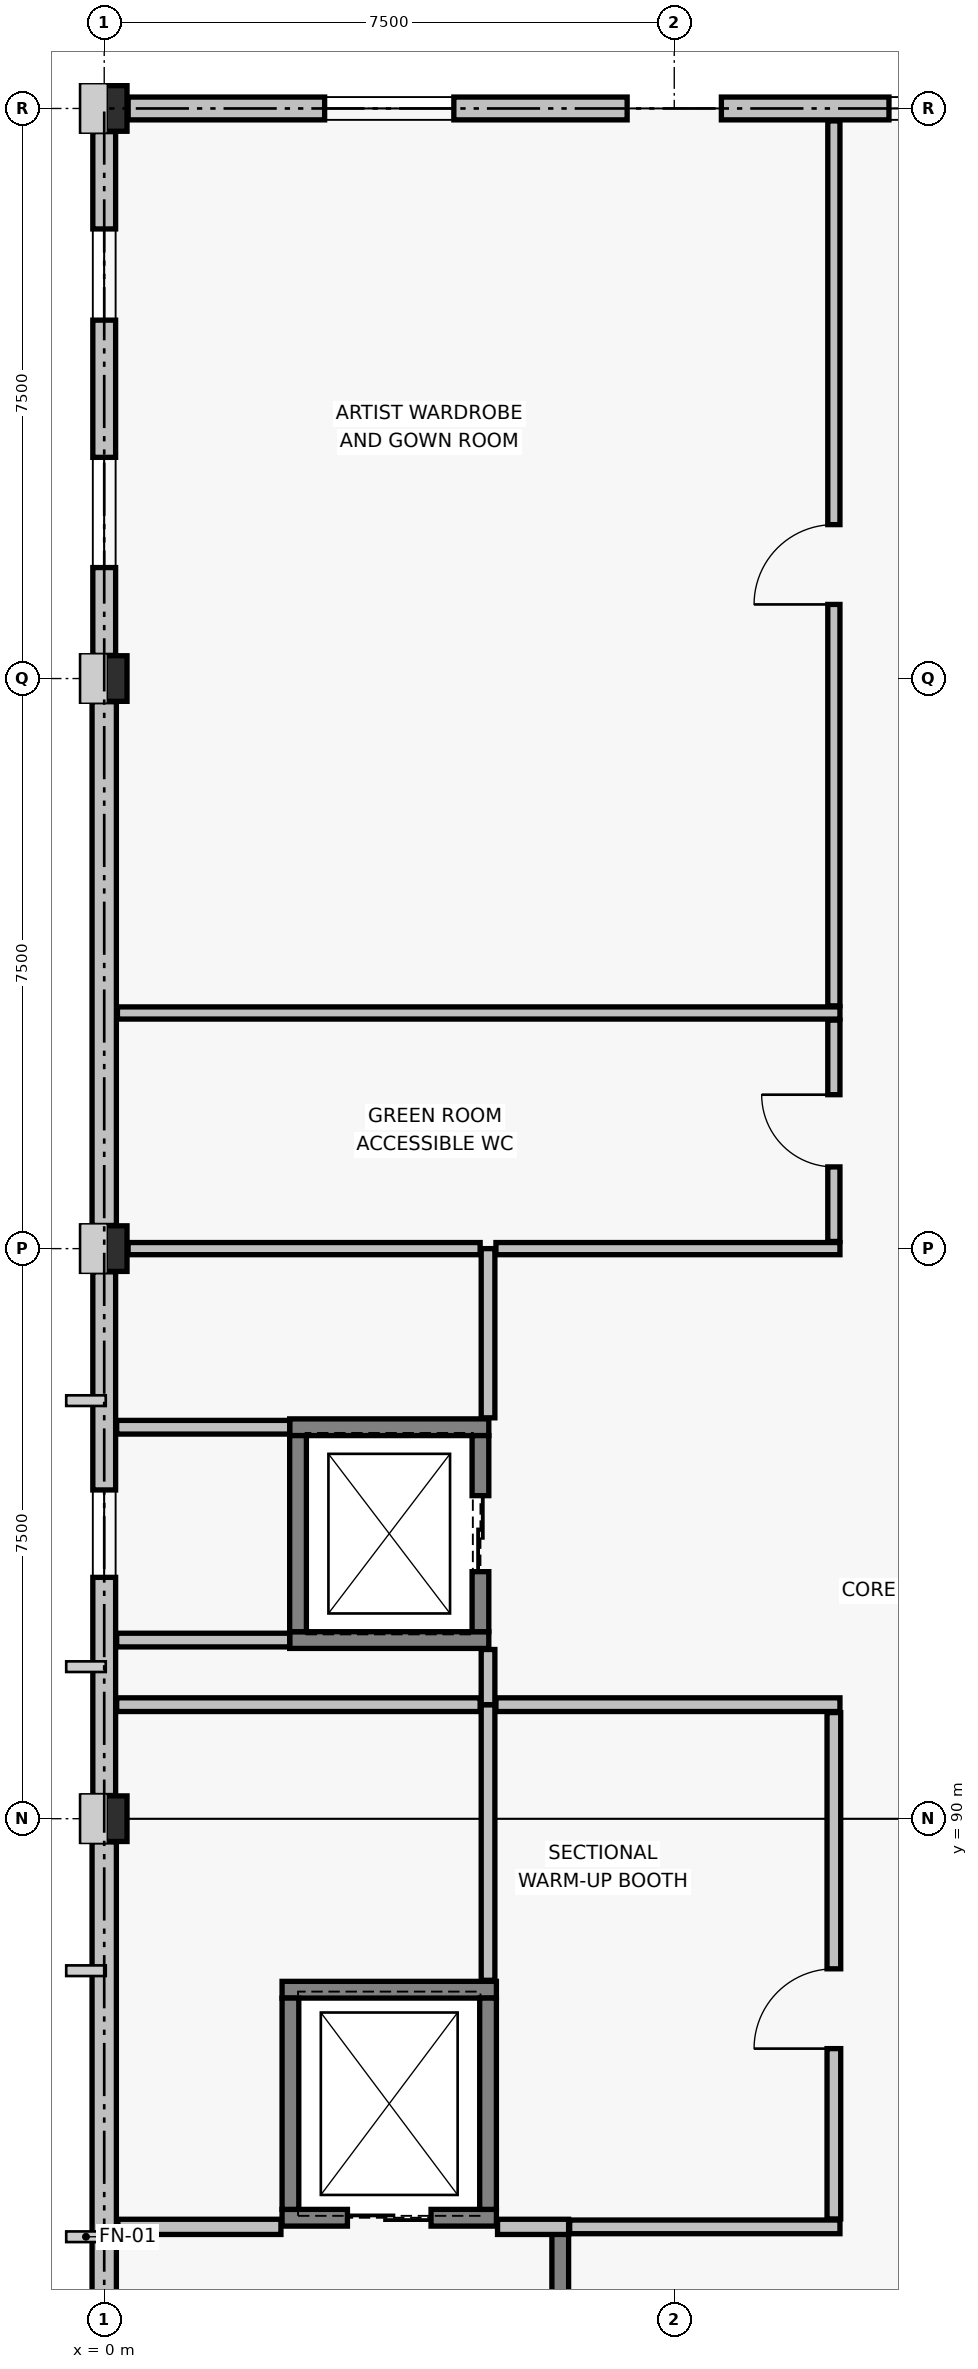
"""IFC4 building model, lengths in metres.
Left out: names, types, materials, properties, quantities, classifications, styles, units other than length and angle.
Written with IfcOpenShell. Run it as: python <this file> out.ifc"""

import sys

from ifc_helpers import new_model, si_unit, direction, frame, frame_2d, origin, origin_2d, place, context, subcontext, project, spatial, rectangle, extrude, element, fill, save


model = new_model("IFC4")
c1 = context("Model", 3, precision=1e-05, world=origin(), true_north=direction((0.0, 1.0)))
c2 = subcontext(c1, "Body", "Model", "MODEL_VIEW")
j1 = project(units=[si_unit("LENGTHUNIT", "METRE"), si_unit("PLANEANGLEUNIT", "RADIAN")], contexts=[c1])
p1 = place(None, origin())
s1 = spatial("IfcSite", under=j1, at=p1, CompositionType="ELEMENT")
p2 = place(p1, origin())
s2 = spatial("IfcBuilding", under=s1, at=p2, CompositionType="ELEMENT")
p3 = place(p2, frame((0.0, 0.0, 9.0)))
s3 = spatial("IfcBuildingStorey", under=s2, at=p3, CompositionType="ELEMENT", Elevation=9.0)
for number, where, z_axis, x_axis in (
    (1, (0.0, 90.0, 0.0), (0.0, 0.0, 1.0), (1.0, 0.0, 0.0)),
    (2, (0.0, 97.5, 0.0), (0.0, 0.0, 1.0), (1.0, 0.0, 0.0)),
    (3, (0.0, 105.0, 0.0), (0.0, 0.0, 1.0), (1.0, 0.0, 0.0)),
    (4, (0.0, 112.5, 0.0), (0.0, 0.0, 1.0), (1.0, 0.0, 0.0)),
):
    element("IfcColumn", number, at=place(p3, frame(where, z_axis=z_axis, x_axis=x_axis)), inside=s3, PredefinedType="COLUMN", context=c2, shape_type="SweptSolid", body=[
        extrude(rectangle(XDim=0.6, YDim=0.6, at=origin_2d()), origin(), (0.0, 0.0, 1.0), 4.2),
    ])
p4 = place(p3, frame((0.315, 112.5, 0.0), z_axis=(0.0, 0.0, 1.0), x_axis=(1.0, 0.0, 0.0)))
e5 = element("IfcWall", 5, at=p4, inside=s3, PredefinedType="SOLIDWALL", context=c2, shape_type="SweptSolid", body=[
    extrude(rectangle(XDim=6.565, YDim=0.3, at=frame_2d((3.282, 0.0))), origin(), (0.0, 0.0, 1.0), 2.87),
])
p5 = place(p4, frame((2.585, 0.0, 0.6)))
e6 = element("IfcOpeningElement", 6, at=p5, cuts=e5, PredefinedType="OPENING", context=c2, shape_type="SweptSolid", body=[
    extrude(rectangle(XDim=1.7, YDim=1.8, at=frame_2d((0.85, 0.9))), frame((0.0, 0.16, 0.0), z_axis=(0.0, -1.0, 0.0), x_axis=(1.0, 0.0, 0.0)), (0.0, 0.0, 1.0), 0.32),
])
p6 = place(p3, frame((8.12, 112.5, 0.0), z_axis=(0.0, 0.0, 1.0), x_axis=(1.0, 0.0, 0.0)))
e7 = element("IfcWall", 7, at=p6, inside=s3, PredefinedType="SOLIDWALL", context=c2, shape_type="SweptSolid", body=[
    extrude(rectangle(XDim=6.565, YDim=0.3, at=frame_2d((3.282, 0.0))), origin(), (0.0, 0.0, 1.0), 2.87),
])
p7 = place(p6, frame((2.205, 0.0, 0.6)))
e8 = element("IfcOpeningElement", 8, at=p7, cuts=e7, PredefinedType="OPENING", context=c2, shape_type="SweptSolid", body=[
    extrude(rectangle(XDim=1.85, YDim=1.8, at=frame_2d((0.925, 0.9))), frame((0.0, 0.16, 0.0), z_axis=(0.0, -1.0, 0.0), x_axis=(1.0, 0.0, 0.0)), (0.0, 0.0, 1.0), 0.32),
])
p8 = place(p3, frame((0.0, 82.805, 0.0), z_axis=(0.0, 0.0, 1.0), x_axis=(0.0, 1.0, 0.0)))
e9 = element("IfcWall", 9, at=p8, inside=s3, PredefinedType="SOLIDWALL", context=c2, shape_type="SweptSolid", body=[
    extrude(rectangle(XDim=6.89, YDim=0.32, at=frame_2d((3.445, 0.0))), origin(), (0.0, 0.0, 1.0), 2.87),
])
p9 = place(p3, frame((0.0, 90.305, 0.0), z_axis=(0.0, 0.0, 1.0), x_axis=(0.0, 1.0, 0.0)))
e10 = element("IfcWall", 10, at=p9, inside=s3, PredefinedType="SOLIDWALL", context=c2, shape_type="SweptSolid", body=[
    extrude(rectangle(XDim=6.89, YDim=0.3, at=frame_2d((3.445, 0.0))), origin(), (0.0, 0.0, 1.0), 2.87),
])
p10 = place(p9, frame((2.87, 0.0, 0.6)))
e11 = element("IfcOpeningElement", 11, at=p10, cuts=e10, PredefinedType="OPENING", context=c2, shape_type="SweptSolid", body=[
    extrude(rectangle(XDim=1.15, YDim=1.3, at=frame_2d((0.575, 0.65))), frame((0.0, 0.16, 0.0), z_axis=(0.0, -1.0, 0.0), x_axis=(1.0, 0.0, 0.0)), (0.0, 0.0, 1.0), 0.32),
])
p11 = place(p3, frame((0.0, 97.805, 0.0), z_axis=(0.0, 0.0, 1.0), x_axis=(0.0, 1.0, 0.0)))
e12 = element("IfcWall", 12, at=p11, inside=s3, PredefinedType="SOLIDWALL", context=c2, shape_type="SweptSolid", body=[
    extrude(rectangle(XDim=6.89, YDim=0.32, at=frame_2d((3.445, 0.0))), origin(), (0.0, 0.0, 1.0), 2.87),
])
p12 = place(p3, frame((0.0, 105.305, 0.0), z_axis=(0.0, 0.0, 1.0), x_axis=(0.0, 1.0, 0.0)))
e13 = element("IfcWall", 13, at=p12, inside=s3, PredefinedType="SOLIDWALL", context=c2, shape_type="SweptSolid", body=[
    extrude(rectangle(XDim=6.89, YDim=0.3, at=frame_2d((3.445, 0.0))), origin(), (0.0, 0.0, 1.0), 2.87),
])
p13 = place(p12, frame((1.155, 0.0, 0.6)))
e14 = element("IfcOpeningElement", 14, at=p13, cuts=e13, PredefinedType="OPENING", context=c2, shape_type="SweptSolid", body=[
    extrude(rectangle(XDim=1.45, YDim=1.3, at=frame_2d((0.725, 0.65))), frame((0.0, 0.16, 0.0), z_axis=(0.0, -1.0, 0.0), x_axis=(1.0, 0.0, 0.0)), (0.0, 0.0, 1.0), 0.32),
])
p14 = place(p12, frame((4.41, 0.0, 0.6)))
e15 = element("IfcOpeningElement", 15, at=p14, cuts=e13, PredefinedType="OPENING", context=c2, shape_type="SweptSolid", body=[
    extrude(rectangle(XDim=1.2, YDim=1.2, at=frame_2d((0.6, 0.6))), frame((0.0, 0.16, 0.0), z_axis=(0.0, -1.0, 0.0), x_axis=(1.0, 0.0, 0.0)), (0.0, 0.0, 1.0), 0.32),
])
for number, where, z_axis, x_axis in (
    (16, (2.44, 92.35, 0.0), (0.0, 0.0, 1.0), (1.0, 0.0, 0.0)),
    (17, (2.44, 95.15, 0.0), (0.0, 0.0, 1.0), (1.0, 0.0, 0.0)),
):
    element("IfcWall", number, at=place(p3, frame(where, z_axis=z_axis, x_axis=x_axis)), inside=s3, PredefinedType="SOLIDWALL", context=c2, shape_type="SweptSolid", body=[
        extrude(rectangle(XDim=2.62, YDim=0.22, at=frame_2d((1.31, 0.0))), origin(), (0.0, 0.0, 1.0), 3.92),
    ])
p15 = place(p3, frame((2.55, 92.46, 0.0), z_axis=(0.0, 0.0, 1.0), x_axis=(0.0, 1.0, 0.0)))
e18 = element("IfcWall", 18, at=p15, inside=s3, PredefinedType="SOLIDWALL", context=c2, shape_type="SweptSolid", body=[
    extrude(rectangle(XDim=2.58, YDim=0.22, at=frame_2d((1.29, 0.0))), origin(), (0.0, 0.0, 1.0), 3.92),
])
p16 = place(p3, frame((4.95, 92.46, 0.0), z_axis=(0.0, 0.0, 1.0), x_axis=(0.0, 1.0, 0.0)))
e19 = element("IfcWall", 19, at=p16, inside=s3, PredefinedType="SOLIDWALL", context=c2, shape_type="SweptSolid", body=[
    extrude(rectangle(XDim=2.58, YDim=0.22, at=frame_2d((1.29, 0.0))), origin(), (0.0, 0.0, 1.0), 3.92),
])
p17 = place(p16, frame((0.79, 0.0, 0.0)))
e20 = element("IfcOpeningElement", 20, at=p17, cuts=e19, PredefinedType="OPENING", context=c2, shape_type="SweptSolid", body=[
    extrude(rectangle(XDim=1.0, YDim=2.15, at=frame_2d((0.5, 1.075))), frame((0.0, 0.12, 0.0), z_axis=(0.0, -1.0, 0.0), x_axis=(1.0, 0.0, 0.0)), (0.0, 0.0, 1.0), 0.24),
])
p18 = place(p3, frame((2.34, 84.75, 0.0), z_axis=(0.0, 0.0, 1.0), x_axis=(1.0, 0.0, 0.0)))
e21 = element("IfcWall", 21, at=p18, inside=s3, PredefinedType="SOLIDWALL", context=c2, shape_type="SweptSolid", body=[
    extrude(rectangle(XDim=2.82, YDim=0.22, at=frame_2d((1.41, 0.0))), origin(), (0.0, 0.0, 1.0), 3.92),
])
p19 = place(p18, frame((0.86, 0.0, 0.0)))
e22 = element("IfcOpeningElement", 22, at=p19, cuts=e21, PredefinedType="OPENING", context=c2, shape_type="SweptSolid", body=[
    extrude(rectangle(XDim=1.1, YDim=2.15, at=frame_2d((0.55, 1.075))), frame((0.0, 0.12, 0.0), z_axis=(0.0, -1.0, 0.0), x_axis=(1.0, 0.0, 0.0)), (0.0, 0.0, 1.0), 0.24),
])
p20 = place(p3, frame((2.34, 87.75, 0.0), z_axis=(0.0, 0.0, 1.0), x_axis=(1.0, 0.0, 0.0)))
e23 = element("IfcWall", 23, at=p20, inside=s3, PredefinedType="SOLIDWALL", context=c2, shape_type="SweptSolid", body=[
    extrude(rectangle(XDim=2.82, YDim=0.22, at=frame_2d((1.41, 0.0))), origin(), (0.0, 0.0, 1.0), 3.92),
])
for number, where, z_axis, x_axis in (
    (24, (2.45, 84.86, 0.0), (0.0, 0.0, 1.0), (0.0, 1.0, 0.0)),
    (25, (5.05, 84.86, 0.0), (0.0, 0.0, 1.0), (0.0, 1.0, 0.0)),
):
    element("IfcWall", number, at=place(p3, frame(where, z_axis=z_axis, x_axis=x_axis)), inside=s3, PredefinedType="SOLIDWALL", context=c2, shape_type="SweptSolid", body=[
        extrude(rectangle(XDim=2.78, YDim=0.22, at=frame_2d((1.39, 0.0))), origin(), (0.0, 0.0, 1.0), 3.92),
    ])
p21 = place(p3, frame((6.0, 80.26, 0.0), z_axis=(0.0, 0.0, 1.0), x_axis=(0.0, 1.0, 0.0)))
e26 = element("IfcWall", 26, at=p21, inside=s3, PredefinedType="SOLIDWALL", context=c2, shape_type="SweptSolid", body=[
    extrude(rectangle(XDim=4.37, YDim=0.22, at=frame_2d((2.185, 0.0))), origin(), (0.0, 0.0, 1.0), 3.92),
])
p22 = place(p21, frame((0.45, 0.0, 0.0)))
e27 = element("IfcOpeningElement", 27, at=p22, cuts=e26, PredefinedType="OPENING", context=c2, shape_type="SweptSolid", body=[
    extrude(rectangle(XDim=1.1, YDim=2.15, at=frame_2d((0.55, 1.075))), frame((0.0, 0.12, 0.0), z_axis=(0.0, -1.0, 0.0), x_axis=(1.0, 0.0, 0.0)), (0.0, 0.0, 1.0), 0.24),
])
p23 = place(p3, frame((0.18, 84.63, 0.0), z_axis=(0.0, 0.0, 1.0), x_axis=(1.0, 0.0, 0.0)))
e28 = element("IfcWall", 28, at=p23, inside=s3, PredefinedType="PARTITIONING", context=c2, shape_type="SweptSolid", body=[
    extrude(rectangle(XDim=2.145, YDim=0.2, at=frame_2d((1.073, 0.0))), origin(), (0.0, 0.0, 1.0), 3.28),
])
p24 = place(p3, frame((5.175, 84.63, 0.0), z_axis=(0.0, 0.0, 1.0), x_axis=(1.0, 0.0, 0.0)))
e29 = element("IfcWall", 29, at=p24, inside=s3, PredefinedType="PARTITIONING", context=c2, shape_type="SweptSolid", body=[
    extrude(rectangle(XDim=0.935, YDim=0.2, at=frame_2d((0.468, 0.0))), origin(), (0.0, 0.0, 1.0), 3.33),
])
p25 = place(p3, frame((5.05, 87.874, 0.0), z_axis=(0.0, 0.0, 1.0), x_axis=(0.0, 1.0, 0.0)))
e30 = element("IfcWall", 30, at=p25, inside=s3, PredefinedType="PARTITIONING", context=c2, shape_type="SweptSolid", body=[
    extrude(rectangle(XDim=3.626, YDim=0.18, at=frame_2d((1.813, 0.0))), origin(), (0.0, 0.0, 1.0), 2.87),
])
p26 = place(p3, frame((6.124, 84.63, 0.0), z_axis=(0.0, 0.0, 1.0), x_axis=(1.0, 0.0, 0.0)))
e31 = element("IfcWall", 31, at=p26, inside=s3, PredefinedType="PARTITIONING", context=c2, shape_type="SweptSolid", body=[
    extrude(rectangle(XDim=3.556, YDim=0.18, at=frame_2d((1.778, 0.0))), origin(), (0.0, 0.0, 1.0), 3.27),
])
p27 = place(p3, frame((0.164, 91.5, 0.0), z_axis=(0.0, 0.0, 1.0), x_axis=(1.0, 0.0, 0.0)))
e32 = element("IfcWall", 32, at=p27, inside=s3, PredefinedType="PARTITIONING", context=c2, shape_type="SweptSolid", body=[
    extrude(rectangle(XDim=4.782, YDim=0.18, at=frame_2d((2.391, 0.0))), origin(), (0.0, 0.0, 1.0), 3.12),
])
p28 = place(p3, frame((5.154, 91.5, 0.0), z_axis=(0.0, 0.0, 1.0), x_axis=(1.0, 0.0, 0.0)))
e33 = element("IfcWall", 33, at=p28, inside=s3, PredefinedType="PARTITIONING", context=c2, shape_type="SweptSolid", body=[
    extrude(rectangle(XDim=4.526, YDim=0.18, at=frame_2d((2.263, 0.0))), origin(), (0.0, 0.0, 1.0), 3.27),
])
p29 = place(p3, frame((9.6, 84.734, 0.0), z_axis=(0.0, 0.0, 1.0), x_axis=(0.0, 1.0, 0.0)))
e34 = element("IfcWall", 34, at=p29, inside=s3, PredefinedType="PARTITIONING", context=c2, shape_type="SweptSolid", body=[
    extrude(rectangle(XDim=6.662, YDim=0.18, at=frame_2d((3.331, 0.0))), origin(), (0.0, 0.0, 1.0), 2.87),
])
p30 = place(p29, frame((2.241, 0.0, 0.0)))
e35 = element("IfcOpeningElement", 35, at=p30, cuts=e34, PredefinedType="OPENING", context=c2, shape_type="SweptSolid", body=[
    extrude(rectangle(XDim=1.05, YDim=2.12, at=frame_2d((0.525, 1.06))), frame((0.0, 0.1, 0.0), z_axis=(0.0, -1.0, 0.0), x_axis=(1.0, 0.0, 0.0)), (0.0, 0.0, 1.0), 0.2),
])
for number, where, z_axis, x_axis in (
    (36, (0.164, 92.35, 0.0), (0.0, 0.0, 1.0), (1.0, 0.0, 0.0)),
    (37, (0.164, 95.15, 0.0), (0.0, 0.0, 1.0), (1.0, 0.0, 0.0)),
):
    element("IfcWall", number, at=place(p3, frame(where, z_axis=z_axis, x_axis=x_axis)), inside=s3, PredefinedType="PARTITIONING", context=c2, shape_type="SweptSolid", body=[
        extrude(rectangle(XDim=2.276, YDim=0.18, at=frame_2d((1.138, 0.0))), origin(), (0.0, 0.0, 1.0), 3.12),
    ])
p31 = place(p3, frame((5.05, 91.5, 0.0), z_axis=(0.0, 0.0, 1.0), x_axis=(0.0, 1.0, 0.0)))
e38 = element("IfcWall", 38, at=p31, inside=s3, PredefinedType="PARTITIONING", context=c2, shape_type="SweptSolid", body=[
    extrude(rectangle(XDim=0.726, YDim=0.18, at=frame_2d((0.363, 0.0))), origin(), (0.0, 0.0, 1.0), 3.27),
])
p32 = place(p3, frame((5.05, 95.274, 0.0), z_axis=(0.0, 0.0, 1.0), x_axis=(0.0, 1.0, 0.0)))
e39 = element("IfcWall", 39, at=p32, inside=s3, PredefinedType="PARTITIONING", context=c2, shape_type="SweptSolid", body=[
    extrude(rectangle(XDim=2.226, YDim=0.18, at=frame_2d((1.113, 0.0))), origin(), (0.0, 0.0, 1.0), 2.87),
])
p33 = place(p3, frame((0.314, 97.5, 0.0), z_axis=(0.0, 0.0, 1.0), x_axis=(1.0, 0.0, 0.0)))
e40 = element("IfcWall", 40, at=p33, inside=s3, PredefinedType="PARTITIONING", context=c2, shape_type="SweptSolid", body=[
    extrude(rectangle(XDim=4.632, YDim=0.16, at=frame_2d((2.316, 0.0))), origin(), (0.0, 0.0, 1.0), 2.87),
])
p34 = place(p3, frame((5.154, 97.5, 0.0), z_axis=(0.0, 0.0, 1.0), x_axis=(1.0, 0.0, 0.0)))
e41 = element("IfcWall", 41, at=p34, inside=s3, PredefinedType="PARTITIONING", context=c2, shape_type="SweptSolid", body=[
    extrude(rectangle(XDim=4.526, YDim=0.16, at=frame_2d((2.263, 0.0))), origin(), (0.0, 0.0, 1.0), 2.87),
])
p35 = place(p3, frame((0.174, 100.6, 0.0), z_axis=(0.0, 0.0, 1.0), x_axis=(1.0, 0.0, 0.0)))
e42 = element("IfcWall", 42, at=p35, inside=s3, PredefinedType="PARTITIONING", context=c2, shape_type="SweptSolid", body=[
    extrude(rectangle(XDim=9.506, YDim=0.16, at=frame_2d((4.753, 0.0))), origin(), (0.0, 0.0, 1.0), 3.12),
])
p36 = place(p3, frame((9.6, 97.594, 0.0), z_axis=(0.0, 0.0, 1.0), x_axis=(0.0, 1.0, 0.0)))
e43 = element("IfcWall", 43, at=p36, inside=s3, PredefinedType="PARTITIONING", context=c2, shape_type="SweptSolid", body=[
    extrude(rectangle(XDim=2.912, YDim=0.16, at=frame_2d((1.456, 0.0))), origin(), (0.0, 0.0, 1.0), 2.87),
])
p37 = place(p36, frame((0.981, 0.0, 0.0)))
e44 = element("IfcOpeningElement", 44, at=p37, cuts=e43, PredefinedType="OPENING", context=c2, shape_type="SweptSolid", body=[
    extrude(rectangle(XDim=0.95, YDim=2.1, at=frame_2d((0.475, 1.05))), frame((0.0, 0.09, 0.0), z_axis=(0.0, -1.0, 0.0), x_axis=(1.0, 0.0, 0.0)), (0.0, 0.0, 1.0), 0.18),
])
p38 = place(p3, frame((9.6, 100.694, 0.0), z_axis=(0.0, 0.0, 1.0), x_axis=(0.0, 1.0, 0.0)))
e45 = element("IfcWall", 45, at=p38, inside=s3, PredefinedType="PARTITIONING", context=c2, shape_type="SweptSolid", body=[
    extrude(rectangle(XDim=11.642, YDim=0.16, at=frame_2d((5.821, 0.0))), origin(), (0.0, 0.0, 1.0), 2.87),
])
p39 = place(p38, frame((5.281, 0.0, 0.0)))
e46 = element("IfcOpeningElement", 46, at=p39, cuts=e45, PredefinedType="OPENING", context=c2, shape_type="SweptSolid", body=[
    extrude(rectangle(XDim=1.05, YDim=2.12, at=frame_2d((0.525, 1.06))), frame((0.0, 0.09, 0.0), z_axis=(0.0, -1.0, 0.0), x_axis=(1.0, 0.0, 0.0)), (0.0, 0.0, 1.0), 0.18),
])
p40 = place(p5, origin())
e47 = element("IfcWindow", 47, at=p40, inside=s3, PartitioningType="SINGLE_PANEL", PredefinedType="WINDOW", context=c2, shape_type="SweptSolid", body=[
    extrude(rectangle(XDim=1.7, YDim=1.8, at=frame_2d((0.85, 0.9))), frame((0.0, 0.03, 0.0), z_axis=(0.0, -1.0, 0.0), x_axis=(1.0, 0.0, 0.0)), (0.0, 0.0, 1.0), 0.06),
])
fill(e6, e47)
p41 = place(p7, origin())
e48 = element("IfcWindow", 48, at=p41, inside=s3, PartitioningType="SINGLE_PANEL", PredefinedType="WINDOW", context=c2, shape_type="SweptSolid", body=[
    extrude(rectangle(XDim=1.85, YDim=1.8, at=frame_2d((0.925, 0.9))), frame((0.0, 0.03, 0.0), z_axis=(0.0, -1.0, 0.0), x_axis=(1.0, 0.0, 0.0)), (0.0, 0.0, 1.0), 0.06),
])
fill(e8, e48)
p42 = place(p10, origin())
e49 = element("IfcWindow", 49, at=p42, inside=s3, PartitioningType="SINGLE_PANEL", PredefinedType="WINDOW", context=c2, shape_type="SweptSolid", body=[
    extrude(rectangle(XDim=1.15, YDim=1.3, at=frame_2d((0.575, 0.65))), frame((0.0, 0.03, 0.0), z_axis=(0.0, -1.0, 0.0), x_axis=(1.0, 0.0, 0.0)), (0.0, 0.0, 1.0), 0.06),
])
fill(e11, e49)
p43 = place(p13, origin())
e50 = element("IfcWindow", 50, at=p43, inside=s3, PartitioningType="SINGLE_PANEL", PredefinedType="WINDOW", context=c2, shape_type="SweptSolid", body=[
    extrude(rectangle(XDim=1.45, YDim=1.3, at=frame_2d((0.725, 0.65))), frame((0.0, 0.03, 0.0), z_axis=(0.0, -1.0, 0.0), x_axis=(1.0, 0.0, 0.0)), (0.0, 0.0, 1.0), 0.06),
])
fill(e14, e50)
p44 = place(p14, origin())
e51 = element("IfcWindow", 51, at=p44, inside=s3, PartitioningType="SINGLE_PANEL", PredefinedType="WINDOW", context=c2, shape_type="SweptSolid", body=[
    extrude(rectangle(XDim=1.2, YDim=1.2, at=frame_2d((0.6, 0.6))), frame((0.0, 0.03, 0.0), z_axis=(0.0, -1.0, 0.0), x_axis=(1.0, 0.0, 0.0)), (0.0, 0.0, 1.0), 0.06),
])
fill(e15, e51)
p45 = place(p17, origin())
e52 = element("IfcDoor", 52, at=p45, inside=s3, OperationType="SLIDING_TO_LEFT", PredefinedType="DOOR", context=c2, shape_type="SweptSolid", body=[
    extrude(rectangle(XDim=1.0, YDim=2.15, at=frame_2d((0.5, 1.075))), frame((0.0, 0.025, 0.0), z_axis=(0.0, -1.0, 0.0), x_axis=(1.0, 0.0, 0.0)), (0.0, 0.0, 1.0), 0.05),
])
fill(e20, e52)
p46 = place(p19, origin())
e53 = element("IfcDoor", 53, at=p46, inside=s3, OperationType="SLIDING_TO_LEFT", PredefinedType="DOOR", context=c2, shape_type="SweptSolid", body=[
    extrude(rectangle(XDim=1.1, YDim=2.15, at=frame_2d((0.55, 1.075))), frame((0.0, 0.025, 0.0), z_axis=(0.0, -1.0, 0.0), x_axis=(1.0, 0.0, 0.0)), (0.0, 0.0, 1.0), 0.05),
])
fill(e22, e53)
p47 = place(p30, origin())
e54 = element("IfcDoor", 54, at=p47, inside=s3, OperationType="SINGLE_SWING_LEFT", PredefinedType="DOOR", context=c2, shape_type="SweptSolid", body=[
    extrude(rectangle(XDim=1.05, YDim=2.12, at=frame_2d((0.525, 1.06))), frame((0.0, 0.025, 0.0), z_axis=(0.0, -1.0, 0.0), x_axis=(1.0, 0.0, 0.0)), (0.0, 0.0, 1.0), 0.05),
])
fill(e35, e54)
p48 = place(p37, origin())
e55 = element("IfcDoor", 55, at=p48, inside=s3, OperationType="SINGLE_SWING_RIGHT", PredefinedType="DOOR", context=c2, shape_type="SweptSolid", body=[
    extrude(rectangle(XDim=0.95, YDim=2.1, at=frame_2d((0.475, 1.05))), frame((0.0, 0.025, 0.0), z_axis=(0.0, -1.0, 0.0), x_axis=(1.0, 0.0, 0.0)), (0.0, 0.0, 1.0), 0.05),
])
fill(e44, e55)
p49 = place(p39, origin())
e56 = element("IfcDoor", 56, at=p49, inside=s3, OperationType="SINGLE_SWING_LEFT", PredefinedType="DOOR", context=c2, shape_type="SweptSolid", body=[
    extrude(rectangle(XDim=1.05, YDim=2.12, at=frame_2d((0.525, 1.06))), frame((0.0, 0.025, 0.0), z_axis=(0.0, -1.0, 0.0), x_axis=(1.0, 0.0, 0.0)), (0.0, 0.0, 1.0), 0.05),
])
fill(e46, e56)
save(model, sys.argv[1])
